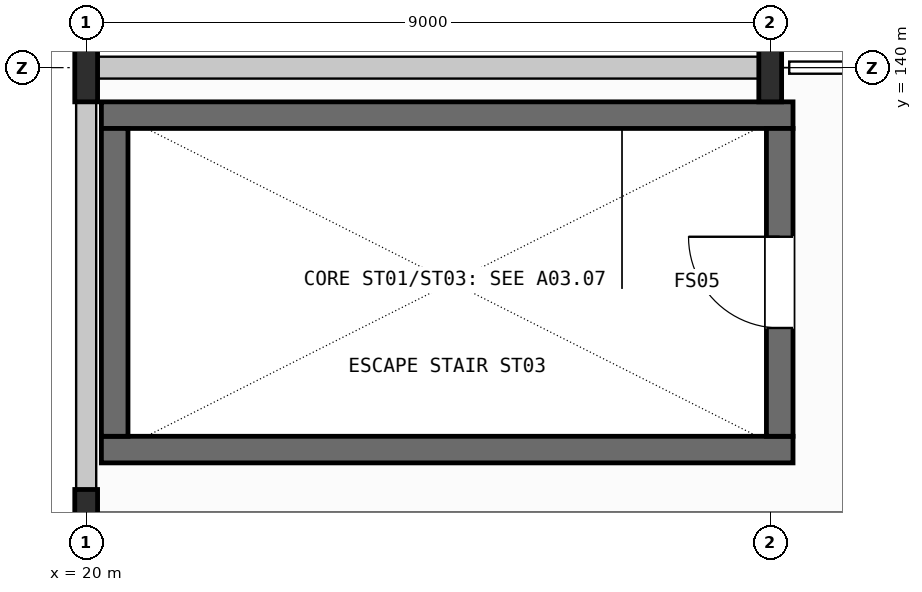
"""IFC4 building model, lengths in metres.
Left out: names, types, materials, properties, quantities, classifications, styles, units other than length and angle.
Written with IfcOpenShell. Run it as: python <this file> out.ifc"""

import sys

from ifc_helpers import new_model, si_unit, direction, frame, frame_2d, origin, origin_2d, place, context, subcontext, project, spatial, rectangle, i_section, extrude, element, fill, save


model = new_model("IFC4")
c1 = context("Model", 3, precision=1e-05, world=origin(), true_north=direction((0.0, 1.0)))
c2 = subcontext(c1, "Body", "Model", "MODEL_VIEW")
j1 = project(units=[si_unit("LENGTHUNIT", "METRE"), si_unit("PLANEANGLEUNIT", "RADIAN")], contexts=[c1])
p1 = place(None, origin())
s1 = spatial("IfcSite", under=j1, at=p1, CompositionType="ELEMENT")
p2 = place(p1, origin())
s2 = spatial("IfcBuilding", under=s1, at=p2, CompositionType="ELEMENT")
p3 = place(p2, frame((0.0, 0.0, 6.0)))
s3 = spatial("IfcBuildingStorey", under=s2, at=p3, CompositionType="ELEMENT", Elevation=6.0)
for number, where, z_axis, x_axis in (
    (1, (20.0, 134.0, 0.0), (0.0, 0.0, 1.0), (1.0, 0.0, 0.0)),
    (2, (20.0, 140.0, 0.0), (0.0, 0.0, 1.0), (1.0, 0.0, 0.0)),
    (3, (29.0, 140.0, 0.0), (0.0, 0.0, 1.0), (1.0, 0.0, 0.0)),
):
    element("IfcColumn", number, at=place(p3, frame(where, z_axis=z_axis, x_axis=x_axis)), inside=s3, PredefinedType="COLUMN", context=c2, shape_type="SweptSolid", body=[
        extrude(i_section(OverallWidth=0.3, OverallDepth=0.9, WebThickness=0.019, FlangeThickness=0.035, FilletRadius=0.03, at=origin_2d()), origin(), (0.0, 0.0, 1.0), 5.4),
    ])
for number, where, z_axis, x_axis in (
    (4, (20.2, 134.975, 0.0), (0.0, 0.0, 1.0), (1.0, 0.0, 0.0)),
    (5, (20.2, 139.375, 0.0), (0.0, 0.0, 1.0), (1.0, 0.0, 0.0)),
):
    element("IfcWall", number, at=place(p3, frame(where, z_axis=z_axis, x_axis=x_axis)), inside=s3, PredefinedType="SHEAR", context=c2, shape_type="SweptSolid", body=[
        extrude(rectangle(XDim=9.1, YDim=0.35, at=frame_2d((4.55, 0.0))), origin(), (0.0, 0.0, 1.0), 4.2),
    ])
p4 = place(p3, frame((20.375, 135.15, 0.0), z_axis=(0.0, 0.0, 1.0), x_axis=(0.0, 1.0, 0.0)))
e6 = element("IfcWall", 6, at=p4, inside=s3, PredefinedType="SHEAR", context=c2, shape_type="SweptSolid", body=[
    extrude(rectangle(XDim=4.05, YDim=0.35, at=frame_2d((2.025, 0.0))), origin(), (0.0, 0.0, 1.0), 4.2),
])
p5 = place(p3, frame((29.125, 135.15, 0.0), z_axis=(0.0, 0.0, 1.0), x_axis=(0.0, 1.0, 0.0)))
e7 = element("IfcWall", 7, at=p5, inside=s3, PredefinedType="SHEAR", context=c2, shape_type="SweptSolid", body=[
    extrude(rectangle(XDim=4.05, YDim=0.35, at=frame_2d((2.025, 0.0))), origin(), (0.0, 0.0, 1.0), 4.2),
])
p6 = place(p5, frame((1.425, 0.0, 0.0)))
e8 = element("IfcOpeningElement", 8, at=p6, cuts=e7, PredefinedType="OPENING", context=c2, shape_type="SweptSolid", body=[
    extrude(rectangle(XDim=1.2, YDim=2.2, at=frame_2d((0.6, 1.1))), frame((0.0, 0.185, 0.0), z_axis=(0.0, -1.0, 0.0), x_axis=(1.0, 0.0, 0.0)), (0.0, 0.0, 1.0), 0.37),
])
p7 = place(p3, frame((20.146, 140.0, 0.0), z_axis=(0.0, 0.0, 1.0), x_axis=(1.0, 0.0, 0.0)))
e9 = element("IfcWall", 9, at=p7, inside=s3, PredefinedType="STANDARD", context=c2, shape_type="SweptSolid", body=[
    extrude(rectangle(XDim=8.708, YDim=0.288, at=frame_2d((4.354, 0.0))), origin(), (0.0, 0.0, 1.0), 3.8),
])
p8 = place(p3, frame((20.0, 134.446, 0.0), z_axis=(0.0, 0.0, 1.0), x_axis=(0.0, 1.0, 0.0)))
e10 = element("IfcWall", 10, at=p8, inside=s3, PredefinedType="STANDARD", context=c2, shape_type="SweptSolid", body=[
    extrude(rectangle(XDim=5.108, YDim=0.264, at=frame_2d((2.554, 0.0))), origin(), (0.0, 0.0, 1.0), 7.6),
])
p9 = place(p6, origin())
e11 = element("IfcDoor", 11, at=p9, inside=s3, OperationType="SINGLE_SWING_RIGHT", PredefinedType="DOOR", context=c2, shape_type="SweptSolid", body=[
    extrude(rectangle(XDim=1.2, YDim=2.2, at=frame_2d((0.6, 1.1))), frame((0.0, 0.025, 0.0), z_axis=(0.0, -1.0, 0.0), x_axis=(1.0, 0.0, 0.0)), (0.0, 0.0, 1.0), 0.05),
])
fill(e8, e11)
save(model, sys.argv[1])
